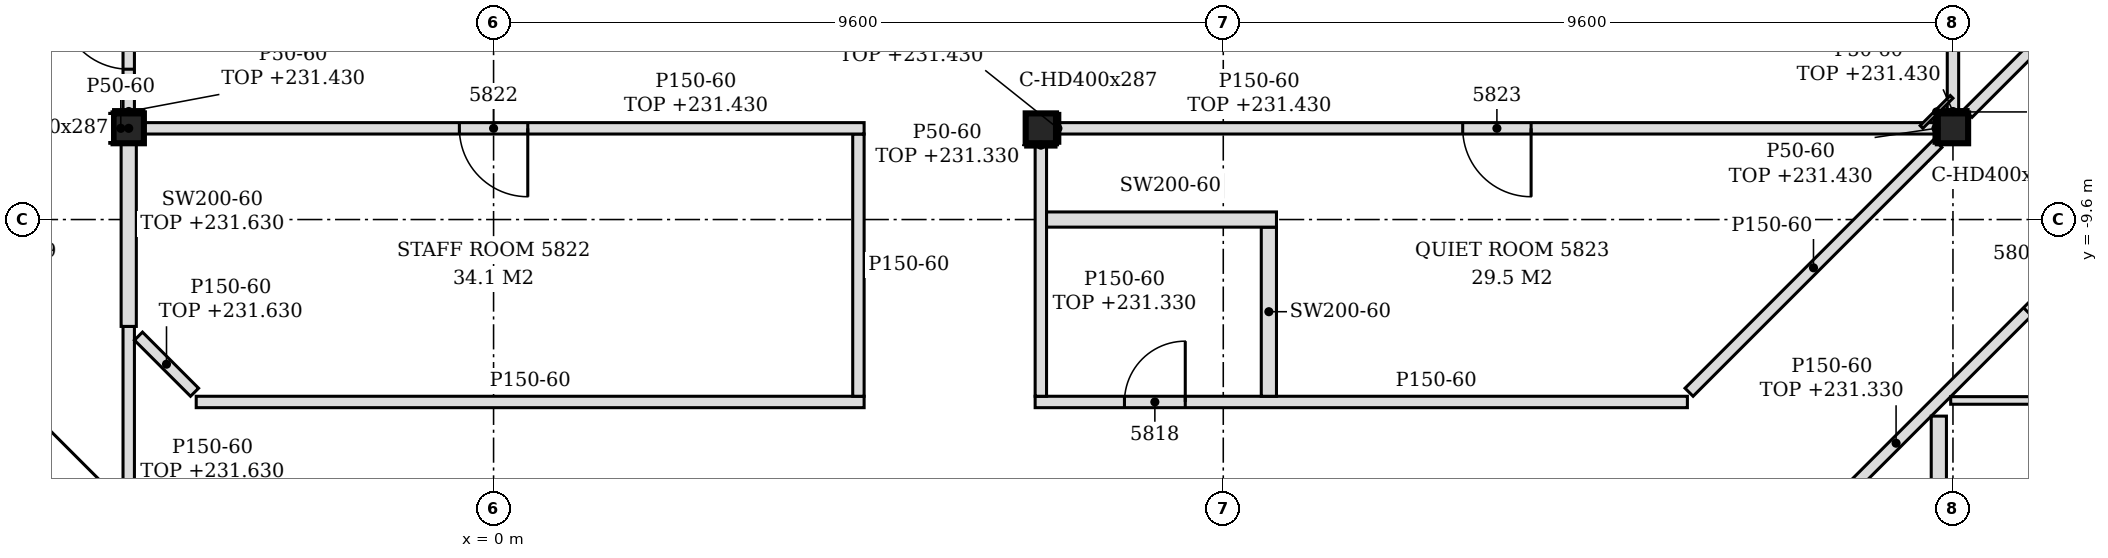
"""IFC4 building model, lengths in metres.
Left out: names, types, materials, properties, quantities, classifications, styles, units other than length and angle.
Written with IfcOpenShell. Run it as: python <this file> out.ifc"""

import sys

from ifc_helpers import new_model, si_unit, direction, frame, frame_2d, origin, origin_2d, place, context, subcontext, project, spatial, polyline, rectangle, i_section, outline, extrude, element, fill, save


model = new_model("IFC4")
c1 = context("Model", 3, precision=1e-05, world=origin(), true_north=direction((0.0, 1.0)))
c2 = subcontext(c1, "Body", "Model", "MODEL_VIEW")
j1 = project(units=[si_unit("LENGTHUNIT", "METRE"), si_unit("PLANEANGLEUNIT", "RADIAN")], contexts=[c1])
p1 = place(None, origin())
s1 = spatial("IfcSite", under=j1, at=p1, CompositionType="ELEMENT")
p2 = place(p1, origin())
s2 = spatial("IfcBuilding", under=s1, at=p2, CompositionType="ELEMENT")
p3 = place(p2, frame((0.0, 0.0, 228.6)))
s3 = spatial("IfcBuildingStorey", under=s2, at=p3, CompositionType="ELEMENT", Elevation=228.6)
for number, where, z_axis, x_axis in (
    (1, (-4.8, -8.4, -0.15), (0.0, 0.0, 1.0), (1.0, 0.0, 0.0)),
    (2, (7.2, -8.4, -0.15), (0.0, 0.0, 1.0), (1.0, 0.0, 0.0)),
    (3, (19.2, -8.4, -0.15), (0.0, 0.0, 1.0), (1.0, 0.0, 0.0)),
):
    element("IfcColumn", number, at=place(p3, frame(where, z_axis=z_axis, x_axis=x_axis)), inside=s3, PredefinedType="COLUMN", context=c2, shape_type="SweptSolid", body=[
        extrude(i_section(OverallWidth=0.399, OverallDepth=0.393, WebThickness=0.023, FlangeThickness=0.037, FilletRadius=0.015, at=origin_2d()), origin(), (0.0, 0.0, 1.0), 3.6),
    ])
p4 = place(p3, frame((19.014, -23.62, 0.0), z_axis=(0.0, 0.0, 1.0), x_axis=(0.0, 1.0, 0.0)))
e4 = element("IfcWall", 4, at=p4, inside=s3, PredefinedType="PARTITIONING", context=c2, shape_type="SweptSolid", body=[
    extrude(outline(polyline([(0.0, 0.0), (11.434, 0.0), (11.434, 2.73), (0.64, 2.73), (0.638, 2.93), (0.37, 2.93), (0.368, 3.45), (0.0, 3.45), (0.0, 0.0)])), frame((0.0, 0.1, 0.0), z_axis=(0.0, -1.0, 0.0), x_axis=(1.0, 0.0, 0.0)), (0.0, 0.0, 1.0), 0.2),
])
p5 = place(p3, frame((16.722, -14.272, 0.0), z_axis=(0.0, 0.0, 1.0), x_axis=(0.707106781187, 0.707106781187, 0.0)))
e5 = element("IfcWall", 5, at=p5, inside=s3, PredefinedType="PARTITIONING", context=c2, shape_type="SweptSolid", body=[
    extrude(rectangle(XDim=20.049, YDim=0.15, at=frame_2d((10.025, 0.0))), origin(), (0.0, 0.0, 1.0), 2.73),
])
p6 = place(p5, frame((4.892, 0.0, 0.0)))
e6 = element("IfcOpeningElement", 6, at=p6, cuts=e5, PredefinedType="OPENING", context=c2, shape_type="SweptSolid", body=[
    extrude(rectangle(XDim=0.9, YDim=2.1, at=frame_2d((0.45, 1.05))), frame((0.0, 0.085, 0.0), z_axis=(0.0, -1.0, 0.0), x_axis=(1.0, 0.0, 0.0)), (0.0, 0.0, 1.0), 0.17),
])
p7 = place(p5, frame((10.042, 0.0, 0.0)))
e7 = element("IfcOpeningElement", 7, at=p7, cuts=e5, PredefinedType="OPENING", context=c2, shape_type="SweptSolid", body=[
    extrude(rectangle(XDim=0.9, YDim=2.1, at=frame_2d((0.45, 1.05))), frame((0.0, 0.085, 0.0), z_axis=(0.0, -1.0, 0.0), x_axis=(1.0, 0.0, 0.0)), (0.0, 0.0, 1.0), 0.17),
])
p8 = place(p5, frame((14.443, 0.0, 0.0)))
e8 = element("IfcOpeningElement", 8, at=p8, cuts=e5, PredefinedType="OPENING", context=c2, shape_type="SweptSolid", body=[
    extrude(rectangle(XDim=0.9, YDim=2.1, at=frame_2d((0.45, 1.05))), frame((0.0, 0.085, 0.0), z_axis=(0.0, -1.0, 0.0), x_axis=(1.0, 0.0, 0.0)), (0.0, 0.0, 1.0), 0.17),
])
p9 = place(p5, frame((17.837, 0.0, 0.0)))
e9 = element("IfcOpeningElement", 9, at=p9, cuts=e5, PredefinedType="OPENING", context=c2, shape_type="SweptSolid", body=[
    extrude(rectangle(XDim=0.9, YDim=2.1, at=frame_2d((0.45, 1.05))), frame((0.0, 0.085, 0.0), z_axis=(0.0, -1.0, 0.0), x_axis=(1.0, 0.0, 0.0)), (0.0, 0.0, 1.0), 0.17),
])
p10 = place(p3, frame((-4.8, -13.926, 0.0), z_axis=(0.0, 0.0, 1.0), x_axis=(0.0, 1.0, 0.0)))
e10 = element("IfcWall", 10, at=p10, inside=s3, PredefinedType="PARTITIONING", context=c2, shape_type="SweptSolid", body=[
    extrude(outline(polyline([(0.0, 0.0), (2.92, 0.0), (2.92, 3.03), (1.369, 3.03), (1.367, 2.63), (0.229, 2.63), (0.227, 3.03), (0.0, 3.03), (0.0, 0.0)])), frame((0.0, 0.075, 0.0), z_axis=(0.0, -1.0, 0.0), x_axis=(1.0, 0.0, 0.0)), (0.0, 0.0, 1.0), 0.15),
])
p11 = place(p3, frame((-3.912, -12.0, 0.0), z_axis=(0.0, 0.0, 1.0), x_axis=(1.0, 0.0, 0.0)))
e11 = element("IfcWall", 11, at=p11, inside=s3, PredefinedType="PARTITIONING", context=c2, shape_type="SweptSolid", body=[
    extrude(rectangle(XDim=8.787, YDim=0.15, at=frame_2d((4.394, 0.0))), origin(), (0.0, 0.0, 1.0), 3.45),
])
p12 = place(p3, frame((7.125, -12.0, 0.0), z_axis=(0.0, 0.0, 1.0), x_axis=(1.0, 0.0, 0.0)))
e12 = element("IfcWall", 12, at=p12, inside=s3, PredefinedType="PARTITIONING", context=c2, shape_type="SweptSolid", body=[
    extrude(outline(polyline([(0.0, 0.0), (8.581, 0.0), (8.581, 3.45), (0.225, 3.45), (0.223, 2.73), (0.0, 2.73), (0.0, 0.0)])), frame((0.0, 0.075, 0.0), z_axis=(0.0, -1.0, 0.0), x_axis=(1.0, 0.0, 0.0)), (0.0, 0.0, 1.0), 0.15),
])
p13 = place(p12, frame((1.175, 0.0, 0.0)))
e13 = element("IfcOpeningElement", 13, at=p13, cuts=e12, PredefinedType="OPENING", context=c2, shape_type="SweptSolid", body=[
    extrude(rectangle(XDim=0.8, YDim=2.1, at=frame_2d((0.4, 1.05))), frame((0.0, 0.085, 0.0), z_axis=(0.0, -1.0, 0.0), x_axis=(1.0, 0.0, 0.0)), (0.0, 0.0, 1.0), 0.17),
])
p14 = place(p3, frame((19.17, -11.98, 0.0), z_axis=(0.0, 0.0, 1.0), x_axis=(1.0, 0.0, 0.0)))
e14 = element("IfcWall", 14, at=p14, inside=s3, PredefinedType="PARTITIONING", context=c2, shape_type="SweptSolid", body=[
    extrude(outline(polyline([(0.0, 0.0), (2.294, 0.0), (2.294, 3.45), (0.18, 3.45), (0.178, 2.73), (0.0, 2.73), (0.0, 0.0)])), frame((0.0, 0.05, 0.0), z_axis=(0.0, -1.0, 0.0), x_axis=(1.0, 0.0, 0.0)), (0.0, 0.0, 1.0), 0.1),
])
p15 = place(p3, frame((-3.934, -11.872, 0.0), z_axis=(0.0, 0.0, 1.0), x_axis=(-0.707106781187, 0.707106781187, 0.0)))
e15 = element("IfcWall", 15, at=p15, inside=s3, PredefinedType="PARTITIONING", context=c2, shape_type="SweptSolid", body=[
    extrude(rectangle(XDim=1.044, YDim=0.15, at=frame_2d((0.522, 0.0))), origin(), (0.0, 0.0, 1.0), 3.03),
])
p16 = place(p3, frame((4.8, -11.925, 0.0), z_axis=(0.0, 0.0, 1.0), x_axis=(0.0, 1.0, 0.0)))
e16 = element("IfcWall", 16, at=p16, inside=s3, PredefinedType="PARTITIONING", context=c2, shape_type="SweptSolid", body=[
    extrude(outline(polyline([(0.0, 0.0), (3.45, 0.0), (3.45, 2.83), (3.375, 2.83), (3.373, 3.45), (0.0, 3.45), (0.0, 0.0)])), frame((0.0, 0.075, 0.0), z_axis=(0.0, -1.0, 0.0), x_axis=(1.0, 0.0, 0.0)), (0.0, 0.0, 1.0), 0.15),
])
p17 = place(p3, frame((7.2, -11.925, 0.0), z_axis=(0.0, 0.0, 1.0), x_axis=(0.0, 1.0, 0.0)))
e17 = element("IfcWall", 17, at=p17, inside=s3, PredefinedType="PARTITIONING", context=c2, shape_type="SweptSolid", body=[
    extrude(rectangle(XDim=3.329, YDim=0.15, at=frame_2d((1.664, 0.0))), origin(), (0.0, 0.0, 1.0), 2.73),
])
p18 = place(p3, frame((10.2, -11.925, 0.0), z_axis=(0.0, 0.0, 1.0), x_axis=(0.0, 1.0, 0.0)))
e18 = element("IfcWall", 18, at=p18, inside=s3, PredefinedType="PARTITIONING", context=c2, shape_type="SweptSolid", body=[
    extrude(rectangle(XDim=2.225, YDim=0.2, at=frame_2d((1.113, 0.0))), origin(), (0.0, 0.0, 1.0), 3.45),
])
p19 = place(p3, frame((15.728, -11.872, 0.0), z_axis=(0.0, 0.0, 1.0), x_axis=(0.707080416772, 0.707133144618, 0.0)))
e19 = element("IfcWall", 19, at=p19, inside=s3, PredefinedType="PARTITIONING", context=c2, shape_type="SweptSolid", body=[
    extrude(rectangle(XDim=4.63, YDim=0.15, at=frame_2d((2.315, 0.0))), origin(), (0.0, 0.0, 1.0), 3.45),
])
p20 = place(p3, frame((-4.8, -11.006, 0.0), z_axis=(0.0, 0.0, 1.0), x_axis=(0.0, 1.0, 0.0)))
e20 = element("IfcWall", 20, at=p20, inside=s3, PredefinedType="PARTITIONING", context=c2, shape_type="SweptSolid", body=[
    extrude(rectangle(XDim=2.41, YDim=0.2, at=frame_2d((1.205, 0.0))), origin(), (0.0, 0.0, 1.0), 3.03),
])
p21 = place(p3, frame((7.275, -9.6, 0.0), z_axis=(0.0, 0.0, 1.0), x_axis=(1.0, 0.0, 0.0)))
e21 = element("IfcWall", 21, at=p21, inside=s3, PredefinedType="PARTITIONING", context=c2, shape_type="SweptSolid", body=[
    extrude(outline(polyline([(0.0, 0.0), (3.025, 0.0), (3.025, 3.45), (0.075, 3.45), (0.073, 2.73), (0.0, 2.73), (0.0, 0.0)])), frame((0.0, 0.1, 0.0), z_axis=(0.0, -1.0, 0.0), x_axis=(1.0, 0.0, 0.0)), (0.0, 0.0, 1.0), 0.2),
])
p22 = place(p3, frame((-4.601, -8.4, 0.0), z_axis=(0.0, 0.0, 1.0), x_axis=(1.0, 0.0, 0.0)))
e22 = element("IfcWall", 22, at=p22, inside=s3, PredefinedType="PARTITIONING", context=c2, shape_type="SweptSolid", body=[
    extrude(rectangle(XDim=9.476, YDim=0.15, at=frame_2d((4.738, 0.0))), origin(), (0.0, 0.0, 1.0), 2.83),
])
p23 = place(p22, frame((4.15, 0.0, 0.0)))
e23 = element("IfcOpeningElement", 23, at=p23, cuts=e22, PredefinedType="OPENING", context=c2, shape_type="SweptSolid", body=[
    extrude(rectangle(XDim=0.9, YDim=2.1, at=frame_2d((0.45, 1.05))), frame((0.0, 0.085, 0.0), z_axis=(0.0, -1.0, 0.0), x_axis=(1.0, 0.0, 0.0)), (0.0, 0.0, 1.0), 0.17),
])
p24 = place(p3, frame((7.399, -8.4, 0.0), z_axis=(0.0, 0.0, 1.0), x_axis=(1.0, 0.0, 0.0)))
e24 = element("IfcWall", 24, at=p24, inside=s3, PredefinedType="PARTITIONING", context=c2, shape_type="SweptSolid", body=[
    extrude(rectangle(XDim=11.601, YDim=0.15, at=frame_2d((5.801, 0.0))), origin(), (0.0, 0.0, 1.0), 2.83),
])
p25 = place(p24, frame((5.351, 0.0, 0.0)))
e25 = element("IfcOpeningElement", 25, at=p25, cuts=e24, PredefinedType="OPENING", context=c2, shape_type="SweptSolid", body=[
    extrude(rectangle(XDim=0.9, YDim=2.1, at=frame_2d((0.45, 1.05))), frame((0.0, 0.085, 0.0), z_axis=(0.0, -1.0, 0.0), x_axis=(1.0, 0.0, 0.0)), (0.0, 0.0, 1.0), 0.17),
])
p26 = place(p3, frame((-4.8, -8.204, 0.0), z_axis=(0.0, 0.0, 1.0), x_axis=(0.0, 1.0, 0.0)))
e26 = element("IfcWall", 26, at=p26, inside=s3, PredefinedType="PARTITIONING", context=c2, shape_type="SweptSolid", body=[
    extrude(rectangle(XDim=10.407, YDim=0.15, at=frame_2d((5.204, 0.0))), origin(), (0.0, 0.0, 1.0), 2.83),
])
p27 = place(p26, frame((8.354, 0.0, 0.0)))
e27 = element("IfcOpeningElement", 27, at=p27, cuts=e26, PredefinedType="OPENING", context=c2, shape_type="SweptSolid", body=[
    extrude(rectangle(XDim=0.9, YDim=2.1, at=frame_2d((0.45, 1.05))), frame((0.0, 0.085, 0.0), z_axis=(0.0, -1.0, 0.0), x_axis=(1.0, 0.0, 0.0)), (0.0, 0.0, 1.0), 0.17),
])
p28 = place(p26, frame((0.582, 0.0, 0.0)))
e28 = element("IfcOpeningElement", 28, at=p28, cuts=e26, PredefinedType="OPENING", context=c2, shape_type="SweptSolid", body=[
    extrude(rectangle(XDim=0.9, YDim=2.1, at=frame_2d((0.45, 1.05))), frame((0.0, 0.085, 0.0), z_axis=(0.0, -1.0, 0.0), x_axis=(1.0, 0.0, 0.0)), (0.0, 0.0, 1.0), 0.17),
])
p29 = place(p3, frame((19.2, -8.204, 0.0), z_axis=(0.0, 0.0, 1.0), x_axis=(0.0, 1.0, 0.0)))
e29 = element("IfcWall", 29, at=p29, inside=s3, PredefinedType="PARTITIONING", context=c2, shape_type="SweptSolid", body=[
    extrude(rectangle(XDim=9.329, YDim=0.15, at=frame_2d((4.664, 0.0))), origin(), (0.0, 0.0, 1.0), 2.83),
])
p30 = place(p29, frame((7.354, 0.0, 0.0)))
e30 = element("IfcOpeningElement", 30, at=p30, cuts=e29, PredefinedType="OPENING", context=c2, shape_type="SweptSolid", body=[
    extrude(rectangle(XDim=0.8, YDim=2.1, at=frame_2d((0.4, 1.05))), frame((0.0, 0.085, 0.0), z_axis=(0.0, -1.0, 0.0), x_axis=(1.0, 0.0, 0.0)), (0.0, 0.0, 1.0), 0.17),
])
p31 = place(p29, frame((4.503, 0.0, 0.0)))
e31 = element("IfcOpeningElement", 31, at=p31, cuts=e29, PredefinedType="OPENING", context=c2, shape_type="SweptSolid", body=[
    extrude(rectangle(XDim=0.8, YDim=2.1, at=frame_2d((0.4, 1.05))), frame((0.0, 0.085, 0.0), z_axis=(0.0, -1.0, 0.0), x_axis=(1.0, 0.0, 0.0)), (0.0, 0.0, 1.0), 0.17),
])
p32 = place(p3, frame((19.398, -8.202, 0.0), z_axis=(0.0, 0.0, 1.0), x_axis=(0.707116088468, 0.707097473782, 0.0)))
e32 = element("IfcWall", 32, at=p32, inside=s3, PredefinedType="PARTITIONING", context=c2, shape_type="SweptSolid", body=[
    extrude(rectangle(XDim=13.115, YDim=0.15, at=frame_2d((6.558, 0.0))), origin(), (0.0, 0.0, 1.0), 2.88),
])
p33 = place(p32, frame((6.058, 0.0, 0.0)))
e33 = element("IfcOpeningElement", 33, at=p33, cuts=e32, PredefinedType="OPENING", context=c2, shape_type="SweptSolid", body=[
    extrude(rectangle(XDim=0.9, YDim=2.1, at=frame_2d((0.45, 1.05))), frame((0.0, 0.085, 0.0), z_axis=(0.0, -1.0, 0.0), x_axis=(1.0, 0.0, 0.0)), (0.0, 0.0, 1.0), 0.17),
])
p34 = place(p3, frame((7.425, -8.596, 0.0), z_axis=(0.0, 0.0, 1.0), x_axis=(0.0, 1.0, 0.0)))
e34 = element("IfcWall", 34, at=p34, inside=s3, PredefinedType="PARTITIONING", context=c2, shape_type="SweptSolid", body=[
    extrude(rectangle(XDim=0.393, YDim=0.05, at=frame_2d((0.196, 0.0))), origin(), (0.0, 0.0, 1.0), 2.83),
])
p35 = place(p3, frame((18.786, -8.382, 0.0), z_axis=(0.0, 0.0, 1.0), x_axis=(0.707106781187, 0.707106781187, 0.0)))
e35 = element("IfcWall", 35, at=p35, inside=s3, PredefinedType="PARTITIONING", context=c2, shape_type="SweptSolid", body=[
    extrude(rectangle(XDim=0.56, YDim=0.05, at=frame_2d((0.28, 0.0))), origin(), (0.0, 0.0, 1.0), 2.83),
])
p36 = place(p3, frame((-5.024, -8.596, 0.0), z_axis=(0.0, 0.0, 1.0), x_axis=(0.0, 1.0, 0.0)))
e36 = element("IfcWall", 36, at=p36, inside=s3, PredefinedType="PARTITIONING", context=c2, shape_type="SweptSolid", body=[
    extrude(rectangle(XDim=0.393, YDim=0.05, at=frame_2d((0.196, 0.0))), origin(), (0.0, 0.0, 1.0), 3.45),
])
p37 = place(p3, frame((-5.0, -8.178, 0.0), z_axis=(0.0, 0.0, 1.0), x_axis=(1.0, 0.0, 0.0)))
e37 = element("IfcWall", 37, at=p37, inside=s3, PredefinedType="PARTITIONING", context=c2, shape_type="SweptSolid", body=[
    extrude(rectangle(XDim=0.399, YDim=0.05, at=frame_2d((0.199, 0.0))), origin(), (0.0, 0.0, 1.0), 2.83),
])
p38 = place(p3, frame((7.0, -8.622, 0.0), z_axis=(0.0, 0.0, 1.0), x_axis=(1.0, 0.0, 0.0)))
e38 = element("IfcWall", 38, at=p38, inside=s3, PredefinedType="PARTITIONING", context=c2, shape_type="SweptSolid", body=[
    extrude(rectangle(XDim=0.399, YDim=0.05, at=frame_2d((0.199, 0.0))), origin(), (0.0, 0.0, 1.0), 2.73),
])
p39 = place(p3, frame((19.0, -8.178, 0.0), z_axis=(0.0, 0.0, 1.0), x_axis=(1.0, 0.0, 0.0)))
e39 = element("IfcWall", 39, at=p39, inside=s3, PredefinedType="PARTITIONING", context=c2, shape_type="SweptSolid", body=[
    extrude(rectangle(XDim=0.399, YDim=0.05, at=frame_2d((0.199, 0.0))), origin(), (0.0, 0.0, 1.0), 2.83),
])
p40 = place(p3, frame((18.976, -8.596, 0.0), z_axis=(0.0, 0.0, 1.0), x_axis=(0.0, 1.0, 0.0)))
e40 = element("IfcWall", 40, at=p40, inside=s3, PredefinedType="PARTITIONING", context=c2, shape_type="SweptSolid", body=[
    extrude(rectangle(XDim=0.393, YDim=0.05, at=frame_2d((0.196, 0.0))), origin(), (0.0, 0.0, 1.0), 2.83),
])
p41 = place(p6, frame((0.9, 0.0, 0.0), z_axis=(0.0, 0.0, 1.0), x_axis=(-1.0, 0.0, 0.0)))
e41 = element("IfcDoor", 41, at=p41, inside=s3, OperationType="SINGLE_SWING_LEFT", PredefinedType="DOOR", context=c2, shape_type="SweptSolid", body=[
    extrude(rectangle(XDim=0.9, YDim=2.1, at=frame_2d((0.45, 1.05))), frame((0.0, 0.025, 0.0), z_axis=(0.0, -1.0, 0.0), x_axis=(1.0, 0.0, 0.0)), (0.0, 0.0, 1.0), 0.05),
])
fill(e6, e41)
p42 = place(p28, origin())
e42 = element("IfcDoor", 42, at=p42, inside=s3, OperationType="SINGLE_SWING_RIGHT", PredefinedType="DOOR", context=c2, shape_type="SweptSolid", body=[
    extrude(rectangle(XDim=0.9, YDim=2.1, at=frame_2d((0.45, 1.05))), frame((0.0, 0.025, 0.0), z_axis=(0.0, -1.0, 0.0), x_axis=(1.0, 0.0, 0.0)), (0.0, 0.0, 1.0), 0.05),
])
fill(e28, e42)
p43 = place(p13, origin())
e43 = element("IfcDoor", 43, at=p43, inside=s3, OperationType="SINGLE_SWING_RIGHT", PredefinedType="DOOR", context=c2, shape_type="SweptSolid", body=[
    extrude(rectangle(XDim=0.8, YDim=2.1, at=frame_2d((0.4, 1.05))), frame((0.0, 0.025, 0.0), z_axis=(0.0, -1.0, 0.0), x_axis=(1.0, 0.0, 0.0)), (0.0, 0.0, 1.0), 0.05),
])
fill(e13, e43)
p44 = place(p23, frame((0.9, 0.0, 0.0), z_axis=(0.0, 0.0, 1.0), x_axis=(-1.0, 0.0, 0.0)))
e44 = element("IfcDoor", 44, at=p44, inside=s3, OperationType="SINGLE_SWING_LEFT", PredefinedType="DOOR", context=c2, shape_type="SweptSolid", body=[
    extrude(rectangle(XDim=0.9, YDim=2.1, at=frame_2d((0.45, 1.05))), frame((0.0, 0.025, 0.0), z_axis=(0.0, -1.0, 0.0), x_axis=(1.0, 0.0, 0.0)), (0.0, 0.0, 1.0), 0.05),
])
fill(e23, e44)
p45 = place(p25, frame((0.9, 0.0, 0.0), z_axis=(0.0, 0.0, 1.0), x_axis=(-1.0, 0.0, 0.0)))
e45 = element("IfcDoor", 45, at=p45, inside=s3, OperationType="SINGLE_SWING_LEFT", PredefinedType="DOOR", context=c2, shape_type="SweptSolid", body=[
    extrude(rectangle(XDim=0.9, YDim=2.1, at=frame_2d((0.45, 1.05))), frame((0.0, 0.025, 0.0), z_axis=(0.0, -1.0, 0.0), x_axis=(1.0, 0.0, 0.0)), (0.0, 0.0, 1.0), 0.05),
])
fill(e25, e45)
save(model, sys.argv[1])
